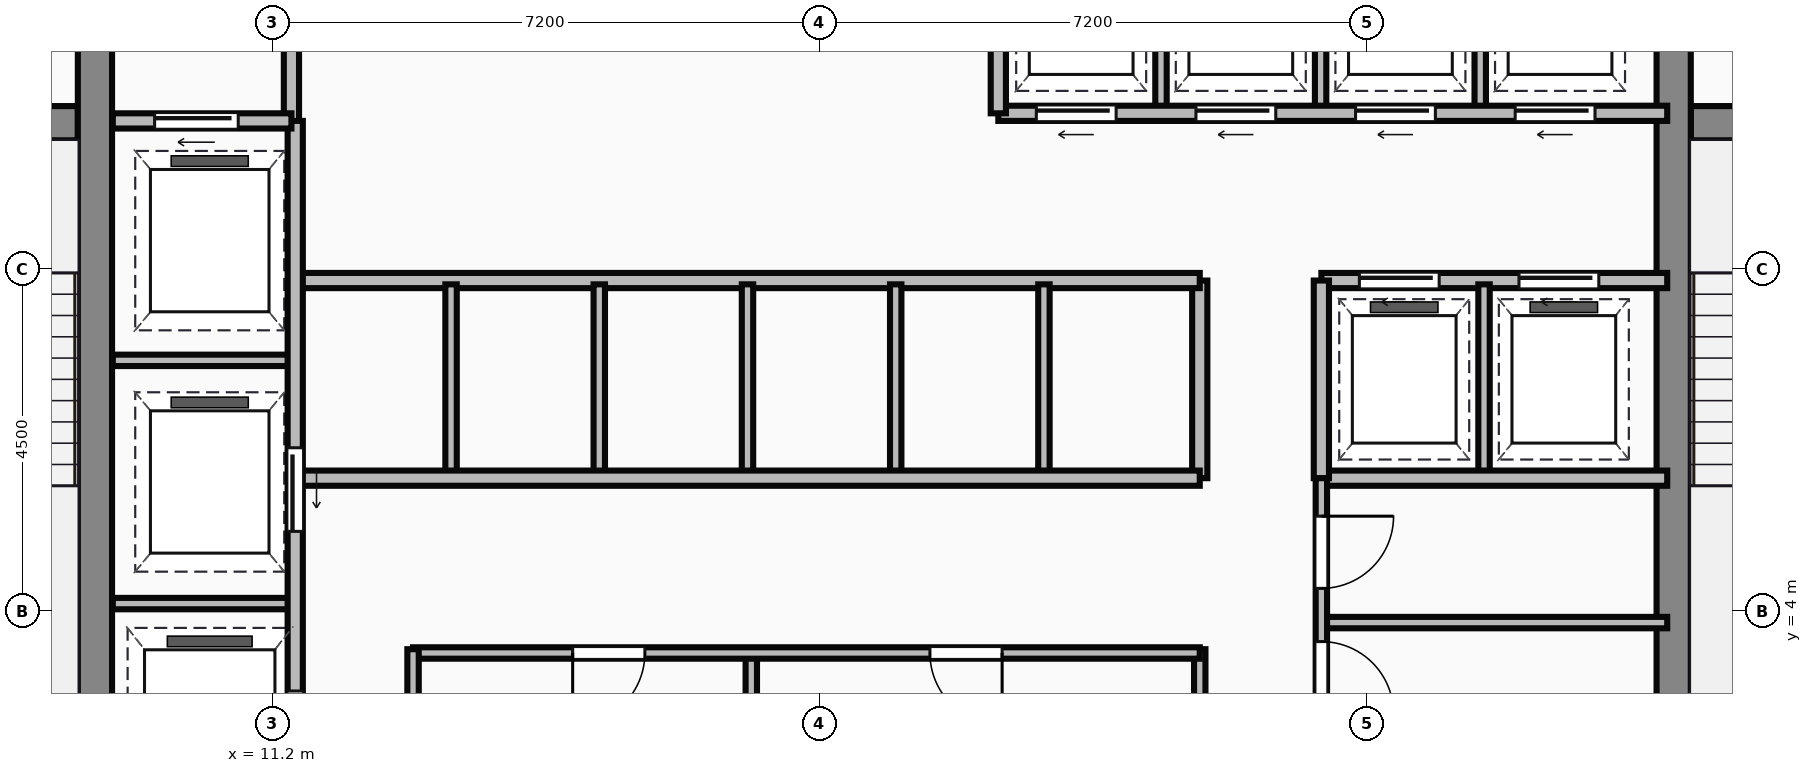
"""IFC4 building model, lengths in metres.
Left out: names, types, materials, properties, quantities, classifications, styles, units other than length and angle.
Written with IfcOpenShell. Run it as: python <this file> out.ifc"""

import sys

from ifc_helpers import new_model, si_unit, direction, frame, frame_2d, origin, place, context, subcontext, project, spatial, rectangle, extrude, source, transform, mapped, element, fill, save


model = new_model("IFC4")
c1 = context("Model", 3, precision=1e-05, world=origin(), true_north=direction((0.0, 1.0)))
c2 = subcontext(c1, "Body", "Model", "MODEL_VIEW")
j1 = project(units=[si_unit("LENGTHUNIT", "METRE"), si_unit("PLANEANGLEUNIT", "RADIAN")], contexts=[c1])
p1 = place(None, origin())
s1 = spatial("IfcSite", under=j1, at=p1, CompositionType="ELEMENT")
p2 = place(p1, origin())
s2 = spatial("IfcBuilding", under=s1, at=p2, CompositionType="ELEMENT")
p3 = place(p2, frame((0.0, 0.0, 188.6)))
s3 = spatial("IfcBuildingStorey", under=s2, at=p3, CompositionType="ELEMENT", Elevation=188.6)
m1 = source(origin(), c2, "Body", "SweptSolid", [
    extrude(rectangle(XDim=12.5, YDim=0.45, at=frame_2d((6.25, 0.0))), origin(), (0.0, 0.0, 1.0), 3.65),
])
for number, where, z_axis, x_axis in (
    (1, (8.865, 0.9, 0.0), (0.0, 0.0, 1.0), (0.0, 1.0, 0.0)),
    (2, (29.635, 0.9, 0.0), (0.0, 0.0, 1.0), (0.0, 1.0, 0.0)),
):
    element("IfcWall", number, at=place(p3, frame(where, z_axis=z_axis, x_axis=x_axis)), inside=s3, PredefinedType="SHEAR", context=c2, shape_type="MappedRepresentation", body=[
        mapped(m1, transform((0.0, 0.0, 0.0))),
    ])
m2 = source(origin(), c2, "Body", "SweptSolid", [
    extrude(rectangle(XDim=3.39, YDim=0.45, at=frame_2d((1.695, 0.0))), origin(), (0.0, 0.0, 1.0), 3.65),
])
p4 = place(p3, frame((5.25, 10.42, 0.0), z_axis=(0.0, 0.0, 1.0), x_axis=(1.0, 0.0, 0.0)))
e3 = element("IfcWall", 3, at=p4, inside=s3, PredefinedType="SHEAR", context=c2, shape_type="MappedRepresentation", body=[
    mapped(m2, transform((0.0, 0.0, 0.0))),
])
p5 = place(p4, frame((1.05, 0.0, 0.0)))
e4 = element("IfcOpeningElement", 4, at=p5, cuts=e3, PredefinedType="OPENING", context=c2, shape_type="SweptSolid", body=[
    extrude(rectangle(XDim=1.1, YDim=2.15, at=frame_2d((0.55, 1.075))), frame((0.0, 0.235, 0.0), z_axis=(0.0, -1.0, 0.0), x_axis=(1.0, 0.0, 0.0)), (0.0, 0.0, 1.0), 0.47),
])
p6 = place(p3, frame((29.86, 10.42, 0.0), z_axis=(0.0, 0.0, 1.0), x_axis=(1.0, 0.0, 0.0)))
e5 = element("IfcWall", 5, at=p6, inside=s3, PredefinedType="SHEAR", context=c2, shape_type="MappedRepresentation", body=[
    mapped(m2, transform((0.0, 0.0, 0.0))),
])
p7 = place(p6, frame((1.1, 0.0, 0.0)))
e6 = element("IfcOpeningElement", 6, at=p7, cuts=e5, PredefinedType="OPENING", context=c2, shape_type="SweptSolid", body=[
    extrude(rectangle(XDim=1.1, YDim=2.15, at=frame_2d((0.55, 1.075))), frame((0.0, 0.235, 0.0), z_axis=(0.0, -1.0, 0.0), x_axis=(1.0, 0.0, 0.0)), (0.0, 0.0, 1.0), 0.47),
])
m3 = source(origin(), c2, "Body", "SweptSolid", [
    extrude(rectangle(XDim=3.18, YDim=0.2, at=frame_2d((1.59, 0.0))), origin(), (0.0, 0.0, 1.0), 3.4),
])
p8 = place(p3, frame((11.45, 10.42, 0.0), z_axis=(0.0, 0.0, 1.0), x_axis=(0.0, 1.0, 0.0)))
e7 = element("IfcWall", 7, at=p8, inside=s3, PredefinedType="PARTITIONING", context=c2, shape_type="MappedRepresentation", body=[
    mapped(m3, transform((0.0, 0.0, 0.0))),
])
m4 = source(origin(), c2, "Body", "SweptSolid", [
    extrude(rectangle(XDim=2.35, YDim=0.2, at=frame_2d((1.175, 0.0))), origin(), (0.0, 0.0, 1.0), 3.4),
])
p9 = place(p3, frame((9.1, 10.45, 0.0), z_axis=(0.0, 0.0, 1.0), x_axis=(1.0, 0.0, 0.0)))
e8 = element("IfcWall", 8, at=p9, inside=s3, PredefinedType="PARTITIONING", context=c2, shape_type="MappedRepresentation", body=[
    mapped(m4, transform((0.0, 0.0, 0.0))),
])
p10 = place(p9, frame((0.55, 0.0, 0.0)))
e9 = element("IfcOpeningElement", 9, at=p10, cuts=e8, PredefinedType="OPENING", context=c2, shape_type="SweptSolid", body=[
    extrude(rectangle(XDim=1.1, YDim=2.15, at=frame_2d((0.55, 1.075))), frame((0.0, 0.11, 0.0), z_axis=(0.0, -1.0, 0.0), x_axis=(1.0, 0.0, 0.0)), (0.0, 0.0, 1.0), 0.22),
])
m5 = source(origin(), c2, "Body", "SweptSolid", [
    extrude(rectangle(XDim=9.6, YDim=0.2, at=frame_2d((4.8, 0.0))), origin(), (0.0, 0.0, 1.0), 3.4),
])
p11 = place(p3, frame((11.5, 0.85, 0.0), z_axis=(0.0, 0.0, 1.0), x_axis=(0.0, 1.0, 0.0)))
e10 = element("IfcWall", 10, at=p11, inside=s3, PredefinedType="PARTITIONING", context=c2, shape_type="MappedRepresentation", body=[
    mapped(m5, transform((0.0, 0.0, 0.0))),
])
p12 = place(p11, frame((4.2, 0.0, 0.0)))
e11 = element("IfcOpeningElement", 11, at=p12, cuts=e10, PredefinedType="OPENING", context=c2, shape_type="SweptSolid", body=[
    extrude(rectangle(XDim=1.1, YDim=2.15, at=frame_2d((0.55, 1.075))), frame((0.0, 0.11, 0.0), z_axis=(0.0, -1.0, 0.0), x_axis=(1.0, 0.0, 0.0)), (0.0, 0.0, 1.0), 0.22),
])
p13 = place(p11, frame((0.9, 0.0, 0.0)))
e12 = element("IfcOpeningElement", 12, at=p13, cuts=e10, PredefinedType="OPENING", context=c2, shape_type="SweptSolid", body=[
    extrude(rectangle(XDim=1.2, YDim=2.15, at=frame_2d((0.6, 1.075))), frame((0.0, 0.11, 0.0), z_axis=(0.0, -1.0, 0.0), x_axis=(1.0, 0.0, 0.0)), (0.0, 0.0, 1.0), 0.22),
])
m6 = source(origin(), c2, "Body", "SweptSolid", [
    extrude(rectangle(XDim=2.4, YDim=0.15, at=frame_2d((1.2, 0.0))), origin(), (0.0, 0.0, 1.0), 3.4),
])
for number, where, z_axis, x_axis in (
    (13, (9.1, 4.1, 0.0), (0.0, 0.0, 1.0), (1.0, 0.0, 0.0)),
    (14, (9.1, 7.3, 0.0), (0.0, 0.0, 1.0), (1.0, 0.0, 0.0)),
):
    element("IfcWall", number, at=place(p3, frame(where, z_axis=z_axis, x_axis=x_axis)), inside=s3, PredefinedType="PARTITIONING", context=c2, shape_type="MappedRepresentation", body=[
        mapped(m6, transform((0.0, 0.0, 0.0))),
    ])
m7 = source(origin(), c2, "Body", "SweptSolid", [
    extrude(rectangle(XDim=2.65, YDim=0.15, at=frame_2d((1.325, 0.0))), origin(), (0.0, 0.0, 1.0), 3.4),
])
p14 = place(p3, frame((13.05, 0.85, 0.0), z_axis=(0.0, 0.0, 1.0), x_axis=(0.0, 1.0, 0.0)))
e15 = element("IfcWall", 15, at=p14, inside=s3, PredefinedType="PARTITIONING", context=c2, shape_type="MappedRepresentation", body=[
    mapped(m7, transform((0.0, 0.0, 0.0))),
])
m8 = source(origin(), c2, "Body", "SweptSolid", [
    extrude(rectangle(XDim=10.35, YDim=0.15, at=frame_2d((5.175, 0.0))), origin(), (0.0, 0.0, 1.0), 3.4),
])
p15 = place(p3, frame((13.05, 3.45, 0.0), z_axis=(0.0, 0.0, 1.0), x_axis=(1.0, 0.0, 0.0)))
e16 = element("IfcWall", 16, at=p15, inside=s3, PredefinedType="PARTITIONING", context=c2, shape_type="MappedRepresentation", body=[
    mapped(m8, transform((0.0, 0.0, 0.0))),
])
p16 = place(p15, frame((2.1, 0.0, 0.0)))
e17 = element("IfcOpeningElement", 17, at=p16, cuts=e16, PredefinedType="OPENING", context=c2, shape_type="SweptSolid", body=[
    extrude(rectangle(XDim=0.95, YDim=2.15, at=frame_2d((0.475, 1.075))), frame((0.0, 0.085, 0.0), z_axis=(0.0, -1.0, 0.0), x_axis=(1.0, 0.0, 0.0)), (0.0, 0.0, 1.0), 0.17),
])
p17 = place(p15, frame((6.8, 0.0, 0.0)))
e18 = element("IfcOpeningElement", 18, at=p17, cuts=e16, PredefinedType="OPENING", context=c2, shape_type="SweptSolid", body=[
    extrude(rectangle(XDim=0.95, YDim=2.15, at=frame_2d((0.475, 1.075))), frame((0.0, 0.085, 0.0), z_axis=(0.0, -1.0, 0.0), x_axis=(1.0, 0.0, 0.0)), (0.0, 0.0, 1.0), 0.17),
])
p18 = place(p3, frame((23.4, 0.85, 0.0), z_axis=(0.0, 0.0, 1.0), x_axis=(0.0, 1.0, 0.0)))
e19 = element("IfcWall", 19, at=p18, inside=s3, PredefinedType="PARTITIONING", context=c2, shape_type="MappedRepresentation", body=[
    mapped(m7, transform((0.0, 0.0, 0.0))),
])
m9 = source(origin(), c2, "Body", "SweptSolid", [
    extrude(rectangle(XDim=2.6, YDim=0.15, at=frame_2d((1.3, 0.0))), origin(), (0.0, 0.0, 1.0), 3.4),
])
p19 = place(p3, frame((17.5, 0.85, 0.0), z_axis=(0.0, 0.0, 1.0), x_axis=(0.0, 1.0, 0.0)))
e20 = element("IfcWall", 20, at=p19, inside=s3, PredefinedType="PARTITIONING", context=c2, shape_type="MappedRepresentation", body=[
    mapped(m9, transform((0.0, 0.0, 0.0))),
])
m10 = source(origin(), c2, "Body", "SweptSolid", [
    extrude(rectangle(XDim=11.85, YDim=0.2, at=frame_2d((5.925, 0.0))), origin(), (0.0, 0.0, 1.0), 3.4),
])
for number, where, z_axis, x_axis in (
    (21, (11.55, 5.75, 0.0), (0.0, 0.0, 1.0), (1.0, 0.0, 0.0)),
    (22, (11.55, 8.35, 0.0), (0.0, 0.0, 1.0), (1.0, 0.0, 0.0)),
):
    element("IfcWall", number, at=place(p3, frame(where, z_axis=z_axis, x_axis=x_axis)), inside=s3, PredefinedType="PARTITIONING", context=c2, shape_type="MappedRepresentation", body=[
        mapped(m10, transform((0.0, 0.0, 0.0))),
    ])
m11 = source(origin(), c2, "Body", "SweptSolid", [
    extrude(rectangle(XDim=2.6, YDim=0.2, at=frame_2d((1.3, 0.0))), origin(), (0.0, 0.0, 1.0), 3.4),
])
p20 = place(p3, frame((23.4, 5.75, 0.0), z_axis=(0.0, 0.0, 1.0), x_axis=(0.0, 1.0, 0.0)))
e23 = element("IfcWall", 23, at=p20, inside=s3, PredefinedType="PARTITIONING", context=c2, shape_type="MappedRepresentation", body=[
    mapped(m11, transform((0.0, 0.0, 0.0))),
])
m12 = source(origin(), c2, "Body", "SweptSolid", [
    extrude(rectangle(XDim=2.5, YDim=0.15, at=frame_2d((1.25, 0.0))), origin(), (0.0, 0.0, 1.0), 3.4),
])
for number, where, z_axis, x_axis in (
    (24, (13.55, 5.8, 0.0), (0.0, 0.0, 1.0), (0.0, 1.0, 0.0)),
    (25, (15.5, 5.8, 0.0), (0.0, 0.0, 1.0), (0.0, 1.0, 0.0)),
    (26, (17.45, 5.8, 0.0), (0.0, 0.0, 1.0), (0.0, 1.0, 0.0)),
    (27, (19.4, 5.8, 0.0), (0.0, 0.0, 1.0), (0.0, 1.0, 0.0)),
    (28, (21.35, 5.8, 0.0), (0.0, 0.0, 1.0), (0.0, 1.0, 0.0)),
):
    element("IfcWall", number, at=place(p3, frame(where, z_axis=z_axis, x_axis=x_axis)), inside=s3, PredefinedType="PARTITIONING", context=c2, shape_type="MappedRepresentation", body=[
        mapped(m12, transform((0.0, 0.0, 0.0))),
    ])
m13 = source(origin(), c2, "Body", "SweptSolid", [
    extrude(rectangle(XDim=8.8, YDim=0.2, at=frame_2d((4.4, 0.0))), origin(), (0.0, 0.0, 1.0), 3.4),
])
p21 = place(p3, frame((20.75, 10.55, 0.0), z_axis=(0.0, 0.0, 1.0), x_axis=(1.0, 0.0, 0.0)))
e29 = element("IfcWall", 29, at=p21, inside=s3, PredefinedType="PARTITIONING", context=c2, shape_type="MappedRepresentation", body=[
    mapped(m13, transform((0.0, 0.0, 0.0))),
])
p22 = place(p21, frame((0.5, 0.0, 0.0)))
e30 = element("IfcOpeningElement", 30, at=p22, cuts=e29, PredefinedType="OPENING", context=c2, shape_type="SweptSolid", body=[
    extrude(rectangle(XDim=1.05, YDim=2.15, at=frame_2d((0.525, 1.075))), frame((0.0, 0.11, 0.0), z_axis=(0.0, -1.0, 0.0), x_axis=(1.0, 0.0, 0.0)), (0.0, 0.0, 1.0), 0.22),
])
p23 = place(p21, frame((2.6, 0.0, 0.0)))
e31 = element("IfcOpeningElement", 31, at=p23, cuts=e29, PredefinedType="OPENING", context=c2, shape_type="SweptSolid", body=[
    extrude(rectangle(XDim=1.05, YDim=2.15, at=frame_2d((0.525, 1.075))), frame((0.0, 0.11, 0.0), z_axis=(0.0, -1.0, 0.0), x_axis=(1.0, 0.0, 0.0)), (0.0, 0.0, 1.0), 0.22),
])
p24 = place(p21, frame((4.7, 0.0, 0.0)))
e32 = element("IfcOpeningElement", 32, at=p24, cuts=e29, PredefinedType="OPENING", context=c2, shape_type="SweptSolid", body=[
    extrude(rectangle(XDim=1.05, YDim=2.15, at=frame_2d((0.525, 1.075))), frame((0.0, 0.11, 0.0), z_axis=(0.0, -1.0, 0.0), x_axis=(1.0, 0.0, 0.0)), (0.0, 0.0, 1.0), 0.22),
])
p25 = place(p21, frame((6.8, 0.0, 0.0)))
e33 = element("IfcOpeningElement", 33, at=p25, cuts=e29, PredefinedType="OPENING", context=c2, shape_type="SweptSolid", body=[
    extrude(rectangle(XDim=1.05, YDim=2.15, at=frame_2d((0.525, 1.075))), frame((0.0, 0.11, 0.0), z_axis=(0.0, -1.0, 0.0), x_axis=(1.0, 0.0, 0.0)), (0.0, 0.0, 1.0), 0.22),
])
m14 = source(origin(), c2, "Body", "SweptSolid", [
    extrude(rectangle(XDim=3.0, YDim=0.2, at=frame_2d((1.5, 0.0))), origin(), (0.0, 0.0, 1.0), 3.4),
])
p26 = place(p3, frame((20.75, 10.55, 0.0), z_axis=(0.0, 0.0, 1.0), x_axis=(0.0, 1.0, 0.0)))
e34 = element("IfcWall", 34, at=p26, inside=s3, PredefinedType="PARTITIONING", context=c2, shape_type="MappedRepresentation", body=[
    mapped(m14, transform((0.0, 0.0, 0.0))),
])
m15 = source(origin(), c2, "Body", "SweptSolid", [
    extrude(rectangle(XDim=2.85, YDim=0.15, at=frame_2d((1.425, 0.0))), origin(), (0.0, 0.0, 1.0), 3.4),
])
for number, where, z_axis, x_axis in (
    (35, (22.89, 10.6, 0.0), (0.0, 0.0, 1.0), (0.0, 1.0, 0.0)),
    (36, (24.99, 10.6, 0.0), (0.0, 0.0, 1.0), (0.0, 1.0, 0.0)),
    (37, (27.09, 10.6, 0.0), (0.0, 0.0, 1.0), (0.0, 1.0, 0.0)),
):
    element("IfcWall", number, at=place(p3, frame(where, z_axis=z_axis, x_axis=x_axis)), inside=s3, PredefinedType="PARTITIONING", context=c2, shape_type="MappedRepresentation", body=[
        mapped(m15, transform((0.0, 0.0, 0.0))),
    ])
m16 = source(origin(), c2, "Body", "SweptSolid", [
    extrude(rectangle(XDim=4.55, YDim=0.2, at=frame_2d((2.275, 0.0))), origin(), (0.0, 0.0, 1.0), 3.4),
])
p27 = place(p3, frame((25.0, 8.35, 0.0), z_axis=(0.0, 0.0, 1.0), x_axis=(1.0, 0.0, 0.0)))
e38 = element("IfcWall", 38, at=p27, inside=s3, PredefinedType="PARTITIONING", context=c2, shape_type="MappedRepresentation", body=[
    mapped(m16, transform((0.0, 0.0, 0.0))),
])
p28 = place(p27, frame((0.5, 0.0, 0.0)))
e39 = element("IfcOpeningElement", 39, at=p28, cuts=e38, PredefinedType="OPENING", context=c2, shape_type="SweptSolid", body=[
    extrude(rectangle(XDim=1.05, YDim=2.15, at=frame_2d((0.525, 1.075))), frame((0.0, 0.11, 0.0), z_axis=(0.0, -1.0, 0.0), x_axis=(1.0, 0.0, 0.0)), (0.0, 0.0, 1.0), 0.22),
])
p29 = place(p27, frame((2.6, 0.0, 0.0)))
e40 = element("IfcOpeningElement", 40, at=p29, cuts=e38, PredefinedType="OPENING", context=c2, shape_type="SweptSolid", body=[
    extrude(rectangle(XDim=1.05, YDim=2.15, at=frame_2d((0.525, 1.075))), frame((0.0, 0.11, 0.0), z_axis=(0.0, -1.0, 0.0), x_axis=(1.0, 0.0, 0.0)), (0.0, 0.0, 1.0), 0.22),
])
p30 = place(p3, frame((25.0, 5.75, 0.0), z_axis=(0.0, 0.0, 1.0), x_axis=(1.0, 0.0, 0.0)))
e41 = element("IfcWall", 41, at=p30, inside=s3, PredefinedType="PARTITIONING", context=c2, shape_type="MappedRepresentation", body=[
    mapped(m16, transform((0.0, 0.0, 0.0))),
])
p31 = place(p3, frame((25.0, 5.75, 0.0), z_axis=(0.0, 0.0, 1.0), x_axis=(0.0, 1.0, 0.0)))
e42 = element("IfcWall", 42, at=p31, inside=s3, PredefinedType="PARTITIONING", context=c2, shape_type="MappedRepresentation", body=[
    mapped(m11, transform((0.0, 0.0, 0.0))),
])
p32 = place(p3, frame((27.14, 5.8, 0.0), z_axis=(0.0, 0.0, 1.0), x_axis=(0.0, 1.0, 0.0)))
e43 = element("IfcWall", 43, at=p32, inside=s3, PredefinedType="PARTITIONING", context=c2, shape_type="MappedRepresentation", body=[
    mapped(m12, transform((0.0, 0.0, 0.0))),
])
m17 = source(origin(), c2, "Body", "SweptSolid", [
    extrude(rectangle(XDim=4.9, YDim=0.15, at=frame_2d((2.45, 0.0))), origin(), (0.0, 0.0, 1.0), 3.4),
])
p33 = place(p3, frame((25.0, 0.85, 0.0), z_axis=(0.0, 0.0, 1.0), x_axis=(0.0, 1.0, 0.0)))
e44 = element("IfcWall", 44, at=p33, inside=s3, PredefinedType="PARTITIONING", context=c2, shape_type="MappedRepresentation", body=[
    mapped(m17, transform((0.0, 0.0, 0.0))),
])
p34 = place(p33, frame((1.8, 0.0, 0.0)))
e45 = element("IfcOpeningElement", 45, at=p34, cuts=e44, PredefinedType="OPENING", context=c2, shape_type="SweptSolid", body=[
    extrude(rectangle(XDim=0.95, YDim=2.15, at=frame_2d((0.475, 1.075))), frame((0.0, 0.085, 0.0), z_axis=(0.0, -1.0, 0.0), x_axis=(1.0, 0.0, 0.0)), (0.0, 0.0, 1.0), 0.17),
])
p35 = place(p33, frame((3.45, 0.0, 0.0)))
e46 = element("IfcOpeningElement", 46, at=p35, cuts=e44, PredefinedType="OPENING", context=c2, shape_type="SweptSolid", body=[
    extrude(rectangle(XDim=0.95, YDim=2.15, at=frame_2d((0.475, 1.075))), frame((0.0, 0.085, 0.0), z_axis=(0.0, -1.0, 0.0), x_axis=(1.0, 0.0, 0.0)), (0.0, 0.0, 1.0), 0.17),
])
m18 = source(origin(), c2, "Body", "SweptSolid", [
    extrude(rectangle(XDim=4.55, YDim=0.15, at=frame_2d((2.275, 0.0))), origin(), (0.0, 0.0, 1.0), 3.4),
])
p36 = place(p3, frame((25.0, 3.85, 0.0), z_axis=(0.0, 0.0, 1.0), x_axis=(1.0, 0.0, 0.0)))
e47 = element("IfcWall", 47, at=p36, inside=s3, PredefinedType="PARTITIONING", context=c2, shape_type="MappedRepresentation", body=[
    mapped(m18, transform((0.0, 0.0, 0.0))),
])
m19 = source(origin(), c2, "Body", "SweptSolid", [
    extrude(rectangle(XDim=1.1, YDim=2.15, at=frame_2d((0.55, 1.075))), frame((0.0, 0.025, 0.0), z_axis=(0.0, -1.0, 0.0), x_axis=(1.0, 0.0, 0.0)), (0.0, 0.0, 1.0), 0.05),
])
p37 = place(p10, origin())
e48 = element("IfcDoor", 48, at=p37, inside=s3, OperationType="SLIDING_TO_LEFT", PredefinedType="DOOR", context=c2, shape_type="MappedRepresentation", body=[
    mapped(m19, transform((0.0, 0.0, 0.0))),
])
fill(e9, e48)
p38 = place(p12, frame((1.1, 0.0, 0.0), z_axis=(0.0, 0.0, 1.0), x_axis=(-1.0, 0.0, 0.0)))
e49 = element("IfcDoor", 49, at=p38, inside=s3, OperationType="SLIDING_TO_LEFT", PredefinedType="DOOR", context=c2, shape_type="MappedRepresentation", body=[
    mapped(m19, transform((0.0, 0.0, 0.0))),
])
fill(e11, e49)
m20 = source(origin(), c2, "Body", "SweptSolid", [
    extrude(rectangle(XDim=1.2, YDim=2.15, at=frame_2d((0.6, 1.075))), frame((0.0, 0.025, 0.0), z_axis=(0.0, -1.0, 0.0), x_axis=(1.0, 0.0, 0.0)), (0.0, 0.0, 1.0), 0.05),
])
p39 = place(p13, frame((1.2, 0.0, 0.0), z_axis=(0.0, 0.0, 1.0), x_axis=(-1.0, 0.0, 0.0)))
e50 = element("IfcDoor", 50, at=p39, inside=s3, OperationType="SLIDING_TO_LEFT", PredefinedType="DOOR", context=c2, shape_type="MappedRepresentation", body=[
    mapped(m20, transform((0.0, 0.0, 0.0))),
])
fill(e12, e50)
m21 = source(origin(), c2, "Body", "SweptSolid", [
    extrude(rectangle(XDim=0.95, YDim=2.15, at=frame_2d((0.475, 1.075))), frame((0.0, 0.025, 0.0), z_axis=(0.0, -1.0, 0.0), x_axis=(1.0, 0.0, 0.0)), (0.0, 0.0, 1.0), 0.05),
])
p40 = place(p16, origin())
e51 = element("IfcDoor", 51, at=p40, inside=s3, OperationType="SINGLE_SWING_LEFT", PredefinedType="DOOR", context=c2, shape_type="MappedRepresentation", body=[
    mapped(m21, transform((0.0, 0.0, 0.0))),
])
fill(e17, e51)
p41 = place(p17, origin())
e52 = element("IfcDoor", 52, at=p41, inside=s3, OperationType="SINGLE_SWING_RIGHT", PredefinedType="DOOR", context=c2, shape_type="MappedRepresentation", body=[
    mapped(m21, transform((0.0, 0.0, 0.0))),
])
fill(e18, e52)
m22 = source(origin(), c2, "Body", "SweptSolid", [
    extrude(rectangle(XDim=1.05, YDim=2.15, at=frame_2d((0.525, 1.075))), frame((0.0, 0.025, 0.0), z_axis=(0.0, -1.0, 0.0), x_axis=(1.0, 0.0, 0.0)), (0.0, 0.0, 1.0), 0.05),
])
p42 = place(p22, frame((1.05, 0.0, 0.0), z_axis=(0.0, 0.0, 1.0), x_axis=(-1.0, 0.0, 0.0)))
e53 = element("IfcDoor", 53, at=p42, inside=s3, OperationType="SLIDING_TO_LEFT", PredefinedType="DOOR", context=c2, shape_type="MappedRepresentation", body=[
    mapped(m22, transform((0.0, 0.0, 0.0))),
])
fill(e30, e53)
p43 = place(p23, frame((1.05, 0.0, 0.0), z_axis=(0.0, 0.0, 1.0), x_axis=(-1.0, 0.0, 0.0)))
e54 = element("IfcDoor", 54, at=p43, inside=s3, OperationType="SLIDING_TO_LEFT", PredefinedType="DOOR", context=c2, shape_type="MappedRepresentation", body=[
    mapped(m22, transform((0.0, 0.0, 0.0))),
])
fill(e31, e54)
p44 = place(p24, frame((1.05, 0.0, 0.0), z_axis=(0.0, 0.0, 1.0), x_axis=(-1.0, 0.0, 0.0)))
e55 = element("IfcDoor", 55, at=p44, inside=s3, OperationType="SLIDING_TO_LEFT", PredefinedType="DOOR", context=c2, shape_type="MappedRepresentation", body=[
    mapped(m22, transform((0.0, 0.0, 0.0))),
])
fill(e32, e55)
p45 = place(p25, frame((1.05, 0.0, 0.0), z_axis=(0.0, 0.0, 1.0), x_axis=(-1.0, 0.0, 0.0)))
e56 = element("IfcDoor", 56, at=p45, inside=s3, OperationType="SLIDING_TO_LEFT", PredefinedType="DOOR", context=c2, shape_type="MappedRepresentation", body=[
    mapped(m22, transform((0.0, 0.0, 0.0))),
])
fill(e33, e56)
p46 = place(p28, origin())
e57 = element("IfcDoor", 57, at=p46, inside=s3, OperationType="SLIDING_TO_LEFT", PredefinedType="DOOR", context=c2, shape_type="MappedRepresentation", body=[
    mapped(m22, transform((0.0, 0.0, 0.0))),
])
fill(e39, e57)
p47 = place(p29, origin())
e58 = element("IfcDoor", 58, at=p47, inside=s3, OperationType="SLIDING_TO_LEFT", PredefinedType="DOOR", context=c2, shape_type="MappedRepresentation", body=[
    mapped(m22, transform((0.0, 0.0, 0.0))),
])
fill(e40, e58)
p48 = place(p34, origin())
e59 = element("IfcDoor", 59, at=p48, inside=s3, OperationType="SINGLE_SWING_LEFT", PredefinedType="DOOR", context=c2, shape_type="MappedRepresentation", body=[
    mapped(m21, transform((0.0, 0.0, 0.0))),
])
fill(e45, e59)
p49 = place(p35, origin())
e60 = element("IfcDoor", 60, at=p49, inside=s3, OperationType="SINGLE_SWING_RIGHT", PredefinedType="DOOR", context=c2, shape_type="MappedRepresentation", body=[
    mapped(m21, transform((0.0, 0.0, 0.0))),
])
fill(e46, e60)
save(model, sys.argv[1])
